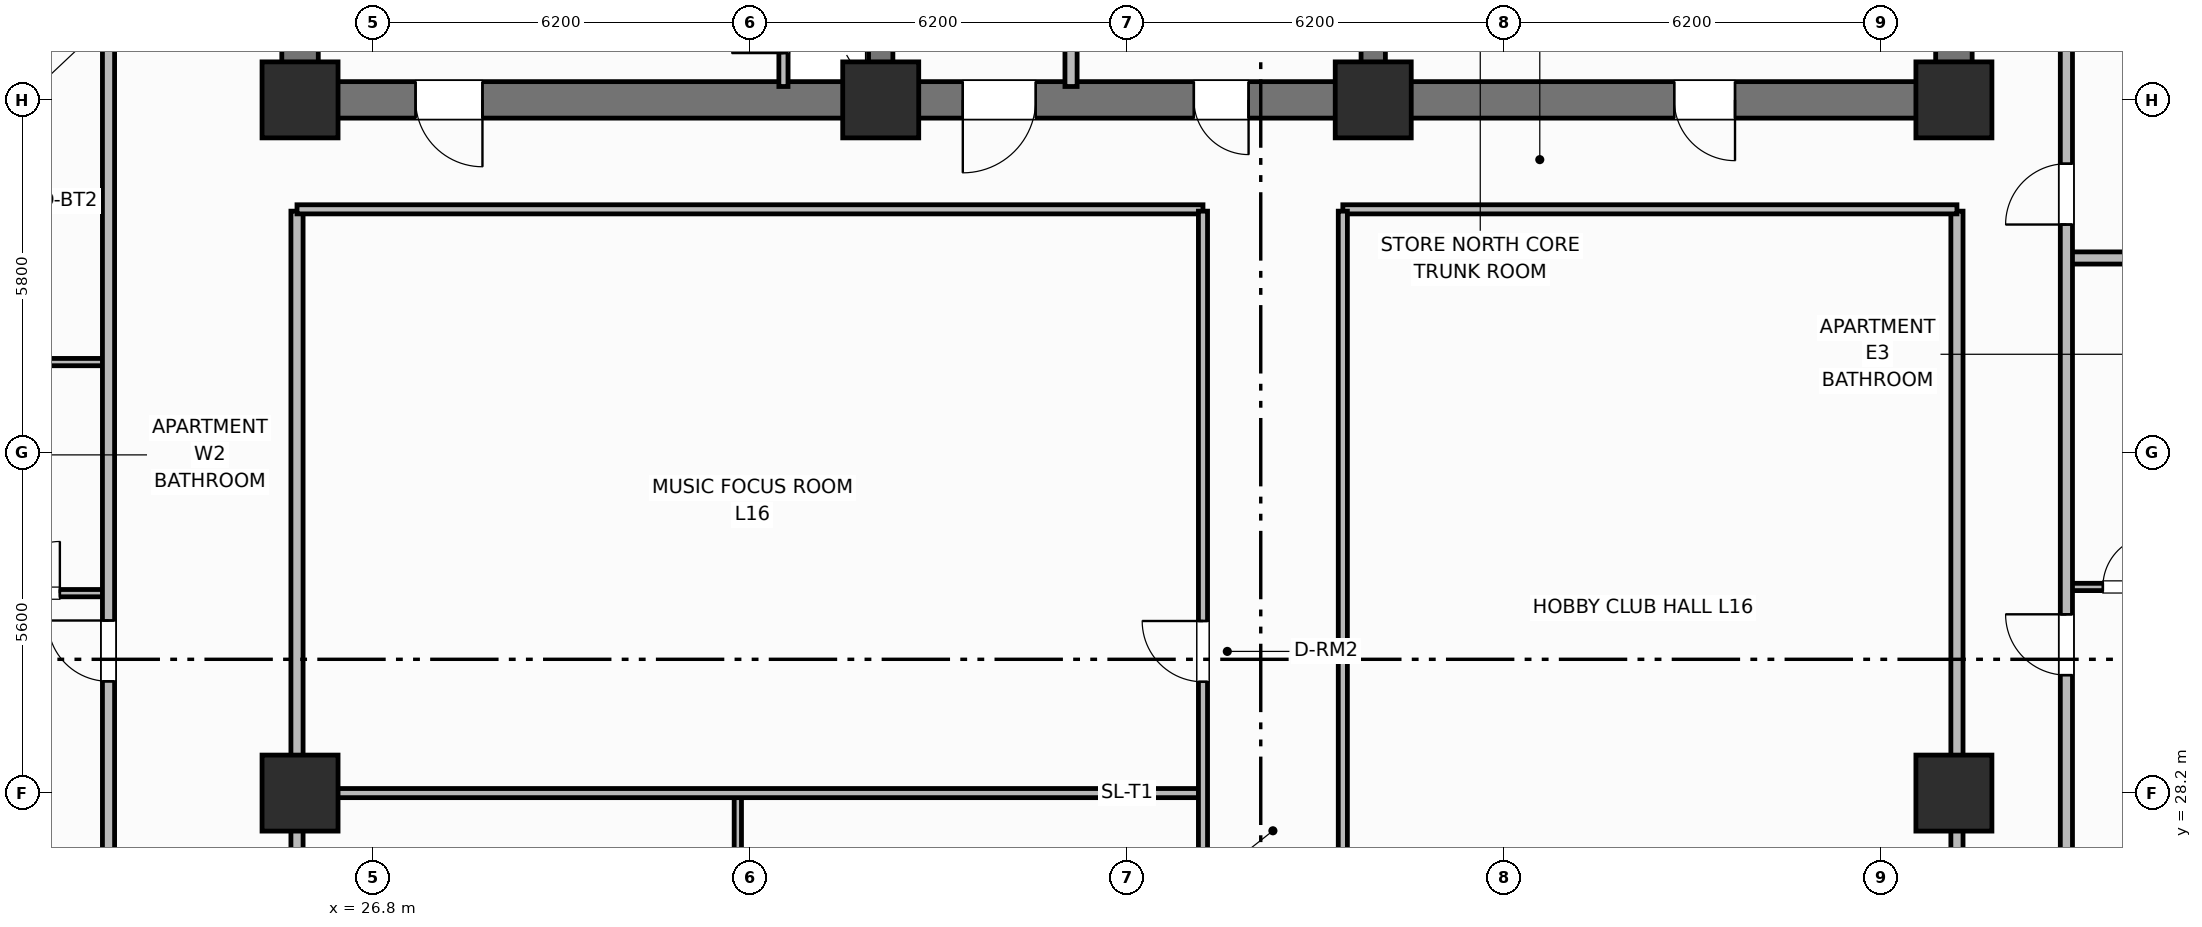
"""IFC4 building model, lengths in metres.
Left out: names, types, materials, properties, quantities, classifications, styles, units other than length and angle.
Written with IfcOpenShell. Run it as: python <this file> out.ifc"""

import sys

from ifc_helpers import new_model, si_unit, direction, frame, frame_2d, origin, origin_2d, place, context, subcontext, project, spatial, rectangle, extrude, element, fill, save


model = new_model("IFC4")
c1 = context("Model", 3, precision=1e-05, world=origin(), true_north=direction((0.0, 1.0)))
c2 = subcontext(c1, "Body", "Model", "MODEL_VIEW")
j1 = project(units=[si_unit("LENGTHUNIT", "METRE"), si_unit("PLANEANGLEUNIT", "RADIAN")], contexts=[c1])
p1 = place(None, origin())
s1 = spatial("IfcSite", under=j1, at=p1, CompositionType="ELEMENT")
p2 = place(p1, origin())
s2 = spatial("IfcBuilding", under=s1, at=p2, CompositionType="ELEMENT")
p3 = place(p2, frame((0.0, 0.0, 65.8)))
s3 = spatial("IfcBuildingStorey", under=s2, at=p3, CompositionType="ELEMENT", Elevation=65.8)
for number, where, z_axis, x_axis in (
    (1, (25.6, 39.9, 0.0), (0.0, 0.0, 1.0), (0.0, 1.0, 0.0)),
    (2, (52.8, 39.9, 0.0), (0.0, 0.0, 1.0), (0.0, 1.0, 0.0)),
):
    element("IfcWall", number, at=place(p3, frame(where, z_axis=z_axis, x_axis=x_axis)), inside=s3, PredefinedType="SHEAR", context=c2, shape_type="SweptSolid", body=[
        extrude(rectangle(XDim=5.6, YDim=0.6, at=frame_2d((2.8, 0.0))), origin(), (0.0, 0.0, 1.0), 3.7),
    ])
p4 = place(p3, frame((52.8, 39.6, 0.0), z_axis=(0.0, 0.0, 1.0), x_axis=(-1.0, 0.0, 0.0)))
e3 = element("IfcWall", 3, at=p4, inside=s3, PredefinedType="SHEAR", context=c2, shape_type="SweptSolid", body=[
    extrude(rectangle(XDim=27.2, YDim=0.6, at=frame_2d((13.6, 0.0))), origin(), (0.0, 0.0, 1.0), 3.7),
])
p5 = place(p4, frame((24.2, 0.0, 0.0)))
e4 = element("IfcOpeningElement", 4, at=p5, cuts=e3, PredefinedType="OPENING", context=c2, shape_type="SweptSolid", body=[
    extrude(rectangle(XDim=1.1, YDim=2.15, at=frame_2d((0.55, 1.075))), frame((0.0, 0.31, 0.0), z_axis=(0.0, -1.0, 0.0), x_axis=(1.0, 0.0, 0.0)), (0.0, 0.0, 1.0), 0.62),
])
p6 = place(p4, frame((15.1, 0.0, 0.0)))
e5 = element("IfcOpeningElement", 5, at=p6, cuts=e3, PredefinedType="OPENING", context=c2, shape_type="SweptSolid", body=[
    extrude(rectangle(XDim=1.2, YDim=2.15, at=frame_2d((0.6, 1.075))), frame((0.0, 0.31, 0.0), z_axis=(0.0, -1.0, 0.0), x_axis=(1.0, 0.0, 0.0)), (0.0, 0.0, 1.0), 0.62),
])
p7 = place(p4, frame((11.6, 0.0, 0.0)))
e6 = element("IfcOpeningElement", 6, at=p7, cuts=e3, PredefinedType="OPENING", context=c2, shape_type="SweptSolid", body=[
    extrude(rectangle(XDim=0.9, YDim=2.1, at=frame_2d((0.45, 1.05))), frame((0.0, 0.31, 0.0), z_axis=(0.0, -1.0, 0.0), x_axis=(1.0, 0.0, 0.0)), (0.0, 0.0, 1.0), 0.62),
])
p8 = place(p4, frame((3.6, 0.0, 0.0)))
e7 = element("IfcOpeningElement", 7, at=p8, cuts=e3, PredefinedType="OPENING", context=c2, shape_type="SweptSolid", body=[
    extrude(rectangle(XDim=1.0, YDim=2.15, at=frame_2d((0.5, 1.075))), frame((0.0, 0.31, 0.0), z_axis=(0.0, -1.0, 0.0), x_axis=(1.0, 0.0, 0.0)), (0.0, 0.0, 1.0), 0.62),
])
for number, where, z_axis, x_axis in (
    (8, (35.15, 39.9, 0.0), (0.0, 0.0, 1.0), (0.0, 1.0, 0.0)),
    (9, (43.25, 39.9, 0.0), (0.0, 0.0, 1.0), (0.0, 1.0, 0.0)),
):
    element("IfcWall", number, at=place(p3, frame(where, z_axis=z_axis, x_axis=x_axis)), inside=s3, PredefinedType="SHEAR", context=c2, shape_type="SweptSolid", body=[
        extrude(rectangle(XDim=5.6, YDim=0.4, at=frame_2d((2.8, 0.0))), origin(), (0.0, 0.0, 1.0), 3.7),
    ])
for number, where, z_axis, x_axis in (
    (10, (25.6, 39.6, 0.0), (0.0, 0.0, 1.0), (1.0, 0.0, 0.0)),
    (11, (35.15, 39.6, 0.0), (0.0, 0.0, 1.0), (1.0, 0.0, 0.0)),
    (12, (43.25, 39.6, 0.0), (0.0, 0.0, 1.0), (1.0, 0.0, 0.0)),
    (13, (52.8, 39.6, 0.0), (0.0, 0.0, 1.0), (1.0, 0.0, 0.0)),
    (14, (25.6, 28.2, 0.0), (0.0, 0.0, 1.0), (1.0, 0.0, 0.0)),
    (15, (52.8, 28.2, 0.0), (0.0, 0.0, 1.0), (1.0, 0.0, 0.0)),
):
    element("IfcColumn", number, at=place(p3, frame(where, z_axis=z_axis, x_axis=x_axis)), inside=s3, PredefinedType="COLUMN", context=c2, shape_type="SweptSolid", body=[
        extrude(rectangle(XDim=1.25, YDim=1.25, at=origin_2d()), origin(), (0.0, 0.0, 1.0), 3.7),
    ])
p9 = place(p3, frame((33.55, 39.82, 0.0), z_axis=(0.0, 0.0, 1.0), x_axis=(0.0, 1.0, 0.0)))
e16 = element("IfcWall", 16, at=p9, inside=s3, PredefinedType="PARTITIONING", context=c2, shape_type="SweptSolid", body=[
    extrude(rectangle(XDim=2.13, YDim=0.15, at=frame_2d((1.065, 0.0))), origin(), (0.0, 0.0, 1.0), 2.53),
])
p10 = place(p9, frame((0.55, 0.0, 0.0)))
e17 = element("IfcOpeningElement", 17, at=p10, cuts=e16, PredefinedType="OPENING", context=c2, shape_type="SweptSolid", body=[
    extrude(rectangle(XDim=0.85, YDim=2.05, at=frame_2d((0.425, 1.025))), frame((0.0, 0.085, 0.0), z_axis=(0.0, -1.0, 0.0), x_axis=(1.0, 0.0, 0.0)), (0.0, 0.0, 1.0), 0.17),
])
p11 = place(p3, frame((38.28, 39.82, 0.0), z_axis=(0.0, 0.0, 1.0), x_axis=(0.0, 1.0, 0.0)))
e18 = element("IfcWall", 18, at=p11, inside=s3, PredefinedType="PARTITIONING", context=c2, shape_type="SweptSolid", body=[
    extrude(rectangle(XDim=2.73, YDim=0.2, at=frame_2d((1.365, 0.0))), origin(), (0.0, 0.0, 1.0), 2.53),
])
for number, where, z_axis, x_axis in (
    (19, (25.55, 18.63, 0.0), (0.0, 0.0, 1.0), (0.0, 1.0, 0.0)),
    (20, (52.85, 18.63, 0.0), (0.0, 0.0, 1.0), (0.0, 1.0, 0.0)),
):
    element("IfcWall", number, at=place(p3, frame(where, z_axis=z_axis, x_axis=x_axis)), inside=s3, PredefinedType="PARTITIONING", context=c2, shape_type="SweptSolid", body=[
        extrude(rectangle(XDim=19.14, YDim=0.2, at=frame_2d((9.57, 0.0))), origin(), (0.0, 0.0, 1.0), 2.53),
    ])
p12 = place(p3, frame((25.55, 37.8, 0.0), z_axis=(0.0, 0.0, 1.0), x_axis=(1.0, 0.0, 0.0)))
e21 = element("IfcWall", 21, at=p12, inside=s3, PredefinedType="PARTITIONING", context=c2, shape_type="SweptSolid", body=[
    extrude(rectangle(XDim=14.9, YDim=0.15, at=frame_2d((7.45, 0.0))), origin(), (0.0, 0.0, 1.0), 2.53),
])
p13 = place(p3, frame((42.75, 37.8, 0.0), z_axis=(0.0, 0.0, 1.0), x_axis=(1.0, 0.0, 0.0)))
e22 = element("IfcWall", 22, at=p13, inside=s3, PredefinedType="PARTITIONING", context=c2, shape_type="SweptSolid", body=[
    extrude(rectangle(XDim=10.1, YDim=0.15, at=frame_2d((5.05, 0.0))), origin(), (0.0, 0.0, 1.0), 2.53),
])
p14 = place(p3, frame((32.8, 18.66, 0.0), z_axis=(0.0, 0.0, 1.0), x_axis=(0.0, 1.0, 0.0)))
e23 = element("IfcWall", 23, at=p14, inside=s3, PredefinedType="PARTITIONING", context=c2, shape_type="SweptSolid", body=[
    extrude(rectangle(XDim=9.49, YDim=0.12, at=frame_2d((4.745, 0.0))), origin(), (0.0, 0.0, 1.0), 2.53),
])
p15 = place(p14, frame((2.2, 0.0, 0.0)))
e24 = element("IfcOpeningElement", 24, at=p15, cuts=e23, PredefinedType="OPENING", context=c2, shape_type="SweptSolid", body=[
    extrude(rectangle(XDim=0.9, YDim=2.1, at=frame_2d((0.45, 1.05))), frame((0.0, 0.07, 0.0), z_axis=(0.0, -1.0, 0.0), x_axis=(1.0, 0.0, 0.0)), (0.0, 0.0, 1.0), 0.14),
])
p16 = place(p3, frame((25.6, 28.2, 0.0), z_axis=(0.0, 0.0, 1.0), x_axis=(1.0, 0.0, 0.0)))
e25 = element("IfcWall", 25, at=p16, inside=s3, PredefinedType="PARTITIONING", context=c2, shape_type="SweptSolid", body=[
    extrude(rectangle(XDim=14.87, YDim=0.15, at=frame_2d((7.435, 0.0))), origin(), (0.0, 0.0, 1.0), 2.53),
])
p17 = place(p3, frame((40.45, 18.63, 0.0), z_axis=(0.0, 0.0, 1.0), x_axis=(0.0, 1.0, 0.0)))
e26 = element("IfcWall", 26, at=p17, inside=s3, PredefinedType="PARTITIONING", context=c2, shape_type="SweptSolid", body=[
    extrude(rectangle(XDim=19.14, YDim=0.15, at=frame_2d((9.57, 0.0))), origin(), (0.0, 0.0, 1.0), 2.53),
])
p18 = place(p17, frame((2.4, 0.0, 0.0)))
e27 = element("IfcOpeningElement", 27, at=p18, cuts=e26, PredefinedType="OPENING", context=c2, shape_type="SweptSolid", body=[
    extrude(rectangle(XDim=1.0, YDim=2.15, at=frame_2d((0.5, 1.075))), frame((0.0, 0.085, 0.0), z_axis=(0.0, -1.0, 0.0), x_axis=(1.0, 0.0, 0.0)), (0.0, 0.0, 1.0), 0.17),
])
p19 = place(p17, frame((11.4, 0.0, 0.0)))
e28 = element("IfcOpeningElement", 28, at=p19, cuts=e26, PredefinedType="OPENING", context=c2, shape_type="SweptSolid", body=[
    extrude(rectangle(XDim=1.0, YDim=2.15, at=frame_2d((0.5, 1.075))), frame((0.0, 0.085, 0.0), z_axis=(0.0, -1.0, 0.0), x_axis=(1.0, 0.0, 0.0)), (0.0, 0.0, 1.0), 0.17),
])
p20 = place(p3, frame((42.75, 18.63, 0.0), z_axis=(0.0, 0.0, 1.0), x_axis=(0.0, 1.0, 0.0)))
e29 = element("IfcWall", 29, at=p20, inside=s3, PredefinedType="PARTITIONING", context=c2, shape_type="SweptSolid", body=[
    extrude(rectangle(XDim=19.14, YDim=0.15, at=frame_2d((9.57, 0.0))), origin(), (0.0, 0.0, 1.0), 2.53),
])
p21 = place(p20, frame((5.5, 0.0, 0.0)))
e30 = element("IfcOpeningElement", 30, at=p21, cuts=e29, PredefinedType="OPENING", context=c2, shape_type="SweptSolid", body=[
    extrude(rectangle(XDim=1.0, YDim=2.15, at=frame_2d((0.5, 1.075))), frame((0.0, 0.085, 0.0), z_axis=(0.0, -1.0, 0.0), x_axis=(1.0, 0.0, 0.0)), (0.0, 0.0, 1.0), 0.17),
])
p22 = place(p3, frame((20.2, 31.488, 0.0), z_axis=(0.0, 0.0, 1.0), x_axis=(1.0, 0.0, 0.0)))
e31 = element("IfcWall", 31, at=p22, inside=s3, PredefinedType="PARTITIONING", context=c2, shape_type="SweptSolid", body=[
    extrude(rectangle(XDim=2.25, YDim=0.12, at=frame_2d((1.125, 0.0))), origin(), (0.0, 0.0, 1.0), 2.53),
])
p23 = place(p22, frame((0.6, 0.0, 0.0)))
e32 = element("IfcOpeningElement", 32, at=p23, cuts=e31, PredefinedType="OPENING", context=c2, shape_type="SweptSolid", body=[
    extrude(rectangle(XDim=0.85, YDim=2.1, at=frame_2d((0.425, 1.05))), frame((0.0, 0.07, 0.0), z_axis=(0.0, -1.0, 0.0), x_axis=(1.0, 0.0, 0.0)), (0.0, 0.0, 1.0), 0.14),
])
p24 = place(p3, frame((20.2, 35.288, 0.0), z_axis=(0.0, 0.0, 1.0), x_axis=(1.0, 0.0, 0.0)))
e33 = element("IfcWall", 33, at=p24, inside=s3, PredefinedType="PARTITIONING", context=c2, shape_type="SweptSolid", body=[
    extrude(rectangle(XDim=2.25, YDim=0.12, at=frame_2d((1.125, 0.0))), origin(), (0.0, 0.0, 1.0), 2.53),
])
p25 = place(p3, frame((22.45, 10.6, 0.0), z_axis=(0.0, 0.0, 1.0), x_axis=(0.0, 1.0, 0.0)))
e34 = element("IfcWall", 34, at=p25, inside=s3, PredefinedType="PARTITIONING", context=c2, shape_type="SweptSolid", body=[
    extrude(rectangle(XDim=35.2, YDim=0.2, at=frame_2d((17.6, 0.0))), origin(), (0.0, 0.0, 1.0), 2.53),
])
p26 = place(p25, frame((2.65, 0.0, 0.0)))
e35 = element("IfcOpeningElement", 35, at=p26, cuts=e34, PredefinedType="OPENING", context=c2, shape_type="SweptSolid", body=[
    extrude(rectangle(XDim=1.0, YDim=2.15, at=frame_2d((0.5, 1.075))), frame((0.0, 0.11, 0.0), z_axis=(0.0, -1.0, 0.0), x_axis=(1.0, 0.0, 0.0)), (0.0, 0.0, 1.0), 0.22),
])
p27 = place(p25, frame((19.438, 0.0, 0.0)))
e36 = element("IfcOpeningElement", 36, at=p27, cuts=e34, PredefinedType="OPENING", context=c2, shape_type="SweptSolid", body=[
    extrude(rectangle(XDim=1.0, YDim=2.15, at=frame_2d((0.5, 1.075))), frame((0.0, 0.11, 0.0), z_axis=(0.0, -1.0, 0.0), x_axis=(1.0, 0.0, 0.0)), (0.0, 0.0, 1.0), 0.22),
])
p28 = place(p3, frame((54.65, 31.59, 0.0), z_axis=(0.0, 0.0, 1.0), x_axis=(1.0, 0.0, 0.0)))
e37 = element("IfcWall", 37, at=p28, inside=s3, PredefinedType="PARTITIONING", context=c2, shape_type="SweptSolid", body=[
    extrude(rectangle(XDim=2.25, YDim=0.12, at=frame_2d((1.125, 0.0))), origin(), (0.0, 0.0, 1.0), 2.53),
])
p29 = place(p28, frame((0.6, 0.0, 0.0)))
e38 = element("IfcOpeningElement", 38, at=p29, cuts=e37, PredefinedType="OPENING", context=c2, shape_type="SweptSolid", body=[
    extrude(rectangle(XDim=0.85, YDim=2.1, at=frame_2d((0.425, 1.05))), frame((0.0, 0.07, 0.0), z_axis=(0.0, -1.0, 0.0), x_axis=(1.0, 0.0, 0.0)), (0.0, 0.0, 1.0), 0.14),
])
p30 = place(p3, frame((54.65, 37.0, 0.0), z_axis=(0.0, 0.0, 1.0), x_axis=(1.0, 0.0, 0.0)))
e39 = element("IfcWall", 39, at=p30, inside=s3, PredefinedType="PARTITIONING", context=c2, shape_type="SweptSolid", body=[
    extrude(rectangle(XDim=9.18, YDim=0.2, at=frame_2d((4.59, 0.0))), origin(), (0.0, 0.0, 1.0), 2.53),
])
p31 = place(p3, frame((54.65, 10.6, 0.0), z_axis=(0.0, 0.0, 1.0), x_axis=(0.0, 1.0, 0.0)))
e40 = element("IfcWall", 40, at=p31, inside=s3, PredefinedType="PARTITIONING", context=c2, shape_type="SweptSolid", body=[
    extrude(rectangle(XDim=35.2, YDim=0.2, at=frame_2d((17.6, 0.0))), origin(), (0.0, 0.0, 1.0), 2.53),
])
p32 = place(p31, frame((2.65, 0.0, 0.0)))
e41 = element("IfcOpeningElement", 41, at=p32, cuts=e40, PredefinedType="OPENING", context=c2, shape_type="SweptSolid", body=[
    extrude(rectangle(XDim=1.0, YDim=2.15, at=frame_2d((0.5, 1.075))), frame((0.0, 0.11, 0.0), z_axis=(0.0, -1.0, 0.0), x_axis=(1.0, 0.0, 0.0)), (0.0, 0.0, 1.0), 0.22),
])
p33 = place(p31, frame((10.81, 0.0, 0.0)))
e42 = element("IfcOpeningElement", 42, at=p33, cuts=e40, PredefinedType="OPENING", context=c2, shape_type="SweptSolid", body=[
    extrude(rectangle(XDim=1.0, YDim=2.15, at=frame_2d((0.5, 1.075))), frame((0.0, 0.11, 0.0), z_axis=(0.0, -1.0, 0.0), x_axis=(1.0, 0.0, 0.0)), (0.0, 0.0, 1.0), 0.22),
])
p34 = place(p31, frame((19.54, 0.0, 0.0)))
e43 = element("IfcOpeningElement", 43, at=p34, cuts=e40, PredefinedType="OPENING", context=c2, shape_type="SweptSolid", body=[
    extrude(rectangle(XDim=1.0, YDim=2.15, at=frame_2d((0.5, 1.075))), frame((0.0, 0.11, 0.0), z_axis=(0.0, -1.0, 0.0), x_axis=(1.0, 0.0, 0.0)), (0.0, 0.0, 1.0), 0.22),
])
p35 = place(p31, frame((26.95, 0.0, 0.0)))
e44 = element("IfcOpeningElement", 44, at=p35, cuts=e40, PredefinedType="OPENING", context=c2, shape_type="SweptSolid", body=[
    extrude(rectangle(XDim=1.0, YDim=2.15, at=frame_2d((0.5, 1.075))), frame((0.0, 0.11, 0.0), z_axis=(0.0, -1.0, 0.0), x_axis=(1.0, 0.0, 0.0)), (0.0, 0.0, 1.0), 0.22),
])
p36 = place(p10, origin())
e45 = element("IfcDoor", 45, at=p36, inside=s3, OperationType="SINGLE_SWING_LEFT", PredefinedType="TRAPDOOR", context=c2, shape_type="SweptSolid", body=[
    extrude(rectangle(XDim=0.85, YDim=2.05, at=frame_2d((0.425, 1.025))), frame((0.0, 0.025, 0.0), z_axis=(0.0, -1.0, 0.0), x_axis=(1.0, 0.0, 0.0)), (0.0, 0.0, 1.0), 0.05),
])
fill(e17, e45)
p37 = place(p19, origin())
e46 = element("IfcDoor", 46, at=p37, inside=s3, OperationType="SINGLE_SWING_RIGHT", PredefinedType="DOOR", context=c2, shape_type="SweptSolid", body=[
    extrude(rectangle(XDim=1.0, YDim=2.15, at=frame_2d((0.5, 1.075))), frame((0.0, 0.025, 0.0), z_axis=(0.0, -1.0, 0.0), x_axis=(1.0, 0.0, 0.0)), (0.0, 0.0, 1.0), 0.05),
])
fill(e28, e46)
p38 = place(p23, origin())
e47 = element("IfcDoor", 47, at=p38, inside=s3, OperationType="SINGLE_SWING_RIGHT", PredefinedType="DOOR", context=c2, shape_type="SweptSolid", body=[
    extrude(rectangle(XDim=0.85, YDim=2.1, at=frame_2d((0.425, 1.05))), frame((0.0, 0.025, 0.0), z_axis=(0.0, -1.0, 0.0), x_axis=(1.0, 0.0, 0.0)), (0.0, 0.0, 1.0), 0.05),
])
fill(e32, e47)
p39 = place(p27, origin())
e48 = element("IfcDoor", 48, at=p39, inside=s3, OperationType="SINGLE_SWING_RIGHT", PredefinedType="DOOR", context=c2, shape_type="SweptSolid", body=[
    extrude(rectangle(XDim=1.0, YDim=2.15, at=frame_2d((0.5, 1.075))), frame((0.0, 0.025, 0.0), z_axis=(0.0, -1.0, 0.0), x_axis=(1.0, 0.0, 0.0)), (0.0, 0.0, 1.0), 0.05),
])
fill(e36, e48)
p40 = place(p29, origin())
e49 = element("IfcDoor", 49, at=p40, inside=s3, OperationType="SINGLE_SWING_RIGHT", PredefinedType="DOOR", context=c2, shape_type="SweptSolid", body=[
    extrude(rectangle(XDim=0.85, YDim=2.1, at=frame_2d((0.425, 1.05))), frame((0.0, 0.025, 0.0), z_axis=(0.0, -1.0, 0.0), x_axis=(1.0, 0.0, 0.0)), (0.0, 0.0, 1.0), 0.05),
])
fill(e38, e49)
p41 = place(p34, origin())
e50 = element("IfcDoor", 50, at=p41, inside=s3, OperationType="SINGLE_SWING_RIGHT", PredefinedType="DOOR", context=c2, shape_type="SweptSolid", body=[
    extrude(rectangle(XDim=1.0, YDim=2.15, at=frame_2d((0.5, 1.075))), frame((0.0, 0.025, 0.0), z_axis=(0.0, -1.0, 0.0), x_axis=(1.0, 0.0, 0.0)), (0.0, 0.0, 1.0), 0.05),
])
fill(e43, e50)
p42 = place(p35, origin())
e51 = element("IfcDoor", 51, at=p42, inside=s3, OperationType="SINGLE_SWING_LEFT", PredefinedType="DOOR", context=c2, shape_type="SweptSolid", body=[
    extrude(rectangle(XDim=1.0, YDim=2.15, at=frame_2d((0.5, 1.075))), frame((0.0, 0.025, 0.0), z_axis=(0.0, -1.0, 0.0), x_axis=(1.0, 0.0, 0.0)), (0.0, 0.0, 1.0), 0.05),
])
fill(e44, e51)
p43 = place(p5, origin())
e52 = element("IfcDoor", 52, at=p43, inside=s3, OperationType="SINGLE_SWING_LEFT", PredefinedType="DOOR", context=c2, shape_type="SweptSolid", body=[
    extrude(rectangle(XDim=1.1, YDim=2.15, at=frame_2d((0.55, 1.075))), frame((0.0, 0.025, 0.0), z_axis=(0.0, -1.0, 0.0), x_axis=(1.0, 0.0, 0.0)), (0.0, 0.0, 1.0), 0.05),
])
fill(e4, e52)
p44 = place(p6, origin())
e53 = element("IfcDoor", 53, at=p44, inside=s3, OperationType="SINGLE_SWING_RIGHT", PredefinedType="DOOR", context=c2, shape_type="SweptSolid", body=[
    extrude(rectangle(XDim=1.2, YDim=2.15, at=frame_2d((0.6, 1.075))), frame((0.0, 0.025, 0.0), z_axis=(0.0, -1.0, 0.0), x_axis=(1.0, 0.0, 0.0)), (0.0, 0.0, 1.0), 0.05),
])
fill(e5, e53)
p45 = place(p7, origin())
e54 = element("IfcDoor", 54, at=p45, inside=s3, OperationType="SINGLE_SWING_LEFT", PredefinedType="DOOR", context=c2, shape_type="SweptSolid", body=[
    extrude(rectangle(XDim=0.9, YDim=2.1, at=frame_2d((0.45, 1.05))), frame((0.0, 0.025, 0.0), z_axis=(0.0, -1.0, 0.0), x_axis=(1.0, 0.0, 0.0)), (0.0, 0.0, 1.0), 0.05),
])
fill(e6, e54)
p46 = place(p8, origin())
e55 = element("IfcDoor", 55, at=p46, inside=s3, OperationType="SINGLE_SWING_LEFT", PredefinedType="DOOR", context=c2, shape_type="SweptSolid", body=[
    extrude(rectangle(XDim=1.0, YDim=2.15, at=frame_2d((0.5, 1.075))), frame((0.0, 0.025, 0.0), z_axis=(0.0, -1.0, 0.0), x_axis=(1.0, 0.0, 0.0)), (0.0, 0.0, 1.0), 0.05),
])
fill(e7, e55)
save(model, sys.argv[1])
